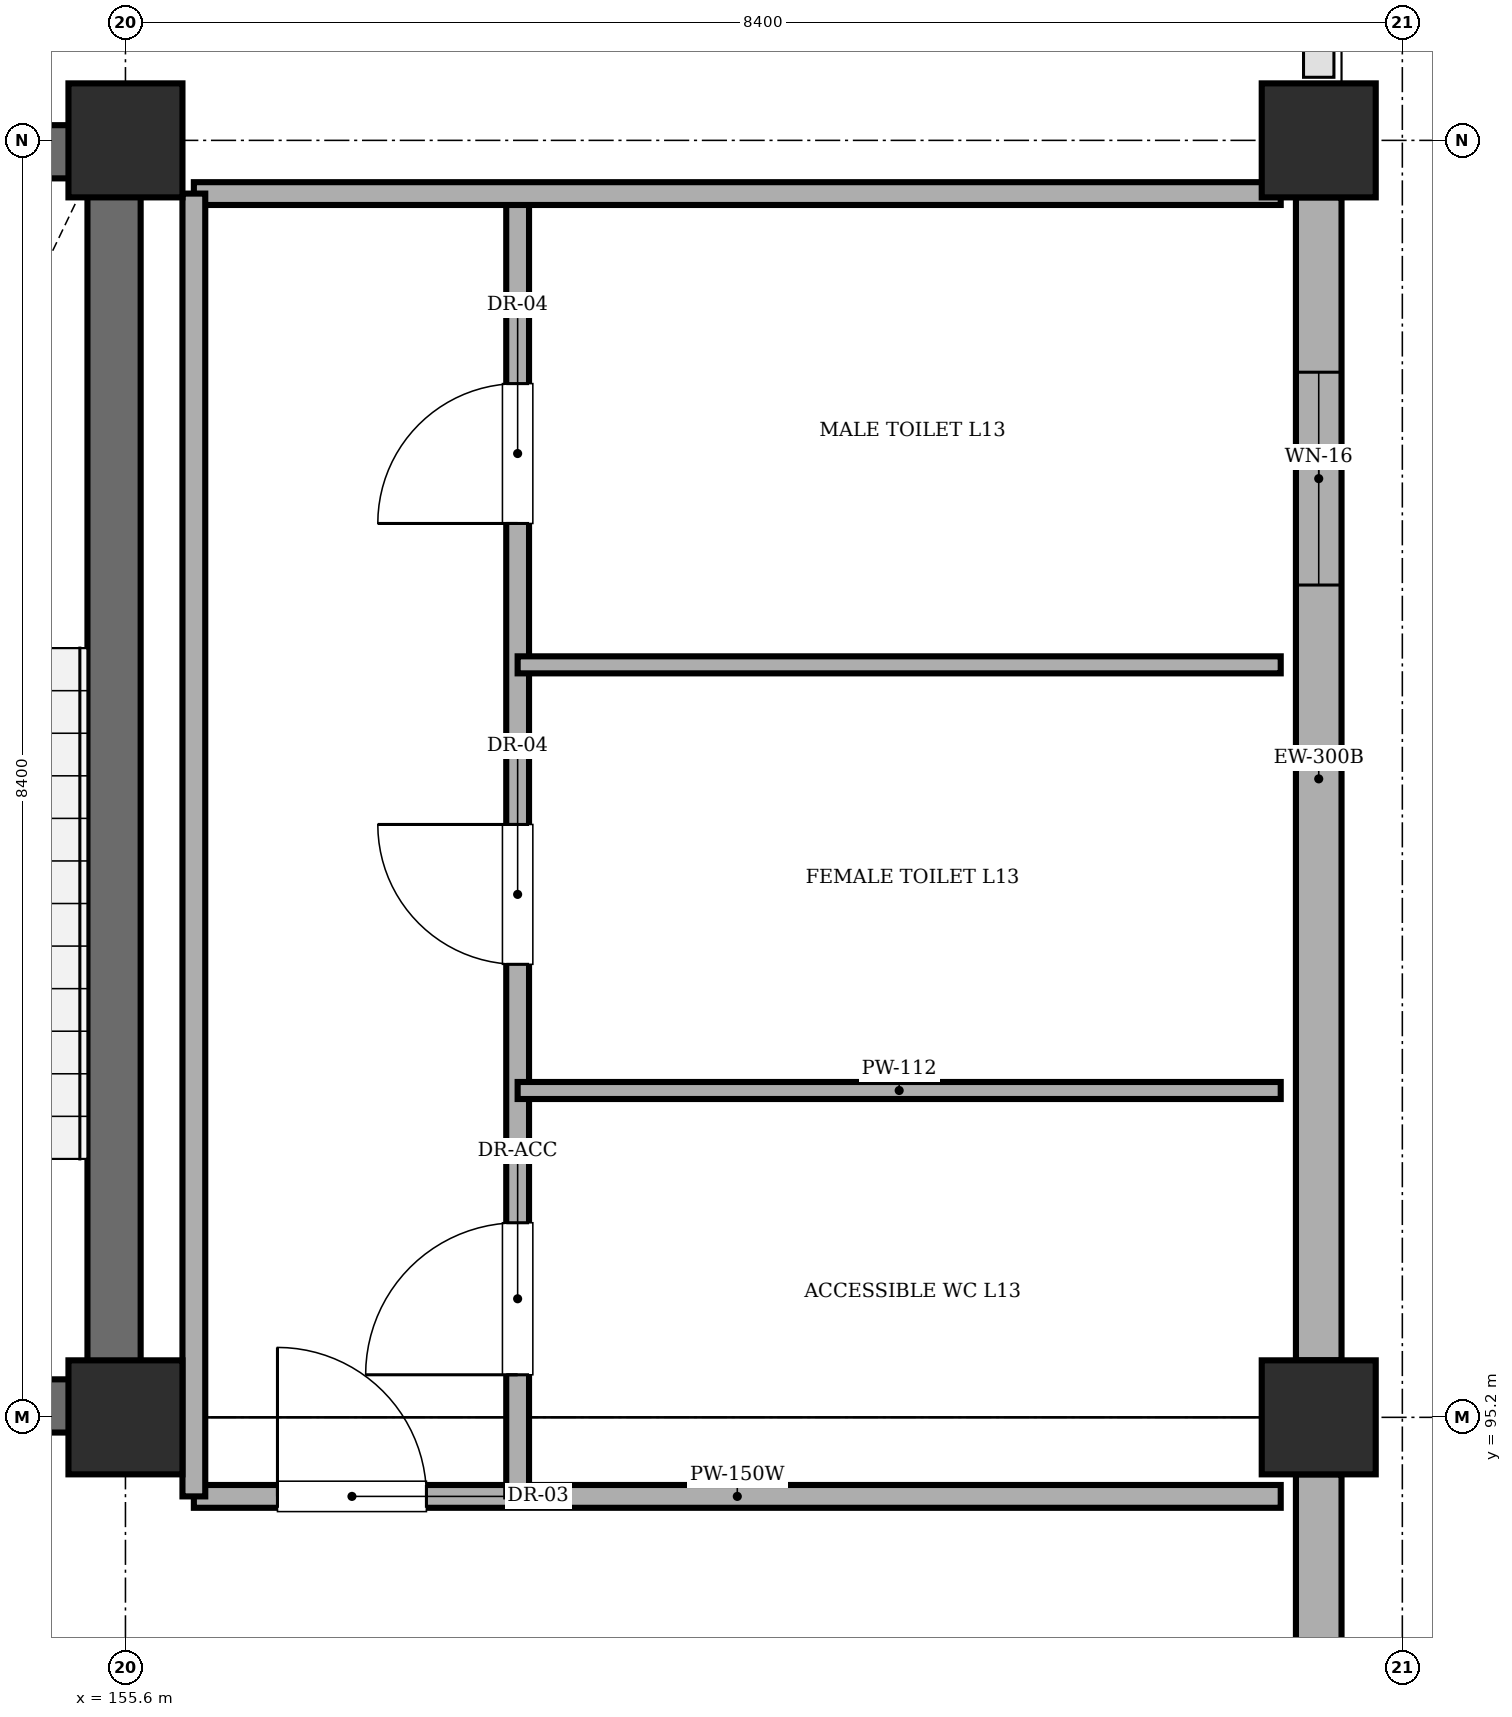
"""IFC4 building model, lengths in metres.
Left out: names, types, materials, properties, quantities, classifications, styles, units other than length and angle.
Written with IfcOpenShell. Run it as: python <this file> out.ifc"""

import sys

from ifc_helpers import new_model, si_unit, direction, frame, frame_2d, origin, origin_2d, place, context, subcontext, project, spatial, rectangle, extrude, element, fill, save


model = new_model("IFC4")
c1 = context("Model", 3, precision=1e-05, world=origin(), true_north=direction((0.0, 1.0)))
c2 = subcontext(c1, "Body", "Model", "MODEL_VIEW")
j1 = project(units=[si_unit("LENGTHUNIT", "METRE"), si_unit("PLANEANGLEUNIT", "RADIAN")], contexts=[c1])
p1 = place(None, origin())
s1 = spatial("IfcSite", under=j1, at=p1, CompositionType="ELEMENT")
p2 = place(p1, origin())
s2 = spatial("IfcBuilding", under=s1, at=p2, CompositionType="ELEMENT")
p3 = place(p2, frame((0.0, 0.0, 52.8)))
s3 = spatial("IfcBuildingStorey", under=s2, at=p3, CompositionType="ELEMENT", Elevation=52.8)
for number, where, z_axis, x_axis in (
    (1, (155.6, 95.2, 0.0), (0.0, 0.0, 1.0), (1.0, 0.0, 0.0)),
    (2, (155.6, 103.6, 0.0), (0.0, 0.0, 1.0), (1.0, 0.0, 0.0)),
    (3, (163.45, 95.2, 0.0), (0.0, 0.0, 1.0), (1.0, 0.0, 0.0)),
    (4, (163.45, 103.6, 0.0), (0.0, 0.0, 1.0), (1.0, 0.0, 0.0)),
):
    element("IfcColumn", number, at=place(p3, frame(where, z_axis=z_axis, x_axis=x_axis)), inside=s3, PredefinedType="COLUMN", context=c2, shape_type="SweptSolid", body=[
        extrude(rectangle(XDim=0.75, YDim=0.75, at=origin_2d()), origin(), (0.0, 0.0, 1.0), 4.03),
    ])
for number, where, z_axis, x_axis in (
    (5, (151.9, 95.275, 0.0), (0.0, 0.0, 1.0), (1.0, 0.0, 0.0)),
    (6, (151.9, 103.525, 0.0), (0.0, 0.0, 1.0), (1.0, 0.0, 0.0)),
):
    element("IfcWall", number, at=place(p3, frame(where, z_axis=z_axis, x_axis=x_axis)), inside=s3, PredefinedType="SHEAR", context=c2, shape_type="SweptSolid", body=[
        extrude(rectangle(XDim=3.8, YDim=0.35, at=frame_2d((1.9, 0.0))), origin(), (0.0, 0.0, 1.0), 4.03),
    ])
p4 = place(p3, frame((155.525, 95.45, 0.0), z_axis=(0.0, 0.0, 1.0), x_axis=(0.0, 1.0, 0.0)))
e7 = element("IfcWall", 7, at=p4, inside=s3, PredefinedType="SHEAR", context=c2, shape_type="SweptSolid", body=[
    extrude(rectangle(XDim=7.9, YDim=0.35, at=frame_2d((3.95, 0.0))), origin(), (0.0, 0.0, 1.0), 4.03),
])
p5 = place(p3, frame((163.45, 94.825, 0.0), z_axis=(0.0, 0.0, 1.0), x_axis=(0.0, -1.0, 0.0)))
e8 = element("IfcWall", 8, at=p5, inside=s3, PredefinedType="STANDARD", context=c2, shape_type="SweptSolid", body=[
    extrude(rectangle(XDim=7.65, YDim=0.3, at=frame_2d((3.825, 0.0))), origin(), (0.0, 0.0, 1.0), 3.33),
])
p6 = place(p5, frame((4.2, 0.0, 1.1)))
e9 = element("IfcOpeningElement", 9, at=p6, cuts=e8, PredefinedType="OPENING", context=c2, shape_type="SweptSolid", body=[
    extrude(rectangle(XDim=1.8, YDim=1.8, at=frame_2d((0.9, 0.9))), frame((0.0, 0.16, 0.0), z_axis=(0.0, -1.0, 0.0), x_axis=(1.0, 0.0, 0.0)), (0.0, 0.0, 1.0), 0.32),
])
p7 = place(p3, frame((163.45, 103.225, 0.0), z_axis=(0.0, 0.0, 1.0), x_axis=(0.0, -1.0, 0.0)))
e10 = element("IfcWall", 10, at=p7, inside=s3, PredefinedType="STANDARD", context=c2, shape_type="SweptSolid", body=[
    extrude(rectangle(XDim=7.65, YDim=0.3, at=frame_2d((3.825, 0.0))), origin(), (0.0, 0.0, 1.0), 3.33),
])
p8 = place(p7, frame((1.15, 0.0, 1.1)))
e11 = element("IfcOpeningElement", 11, at=p8, cuts=e10, PredefinedType="OPENING", context=c2, shape_type="SweptSolid", body=[
    extrude(rectangle(XDim=1.4, YDim=1.4, at=frame_2d((0.7, 0.7))), frame((0.0, 0.16, 0.0), z_axis=(0.0, -1.0, 0.0), x_axis=(1.0, 0.0, 0.0)), (0.0, 0.0, 1.0), 0.32),
])
p9 = place(p3, frame((156.05, 94.68, 0.0), z_axis=(0.0, 0.0, 1.0), x_axis=(1.0, 0.0, 0.0)))
e12 = element("IfcWall", 12, at=p9, inside=s3, PredefinedType="PARTITIONING", context=c2, shape_type="SweptSolid", body=[
    extrude(rectangle(XDim=7.15, YDim=0.15, at=frame_2d((3.575, 0.0))), origin(), (0.0, 0.0, 1.0), 4.03),
])
p10 = place(p9, frame((0.55, 0.0, 0.0)))
e13 = element("IfcOpeningElement", 13, at=p10, cuts=e12, PredefinedType="OPENING", context=c2, shape_type="SweptSolid", body=[
    extrude(rectangle(XDim=0.98, YDim=2.12, at=frame_2d((0.49, 1.06))), frame((0.0, 0.085, 0.0), z_axis=(0.0, -1.0, 0.0), x_axis=(1.0, 0.0, 0.0)), (0.0, 0.0, 1.0), 0.17),
])
p11 = place(p3, frame((158.18, 94.68, 0.0), z_axis=(0.0, 0.0, 1.0), x_axis=(0.0, 1.0, 0.0)))
e14 = element("IfcWall", 14, at=p11, inside=s3, PredefinedType="PARTITIONING", context=c2, shape_type="SweptSolid", body=[
    extrude(rectangle(XDim=8.57, YDim=0.15, at=frame_2d((4.285, 0.0))), origin(), (0.0, 0.0, 1.0), 4.03),
])
p12 = place(p11, frame((0.8, 0.0, 0.0)))
e15 = element("IfcOpeningElement", 15, at=p12, cuts=e14, PredefinedType="OPENING", context=c2, shape_type="SweptSolid", body=[
    extrude(rectangle(XDim=1.0, YDim=2.12, at=frame_2d((0.5, 1.06))), frame((0.0, 0.085, 0.0), z_axis=(0.0, -1.0, 0.0), x_axis=(1.0, 0.0, 0.0)), (0.0, 0.0, 1.0), 0.17),
])
p13 = place(p11, frame((3.5, 0.0, 0.0)))
e16 = element("IfcOpeningElement", 16, at=p13, cuts=e14, PredefinedType="OPENING", context=c2, shape_type="SweptSolid", body=[
    extrude(rectangle(XDim=0.92, YDim=2.1, at=frame_2d((0.46, 1.05))), frame((0.0, 0.085, 0.0), z_axis=(0.0, -1.0, 0.0), x_axis=(1.0, 0.0, 0.0)), (0.0, 0.0, 1.0), 0.17),
])
p14 = place(p11, frame((6.4, 0.0, 0.0)))
e17 = element("IfcOpeningElement", 17, at=p14, cuts=e14, PredefinedType="OPENING", context=c2, shape_type="SweptSolid", body=[
    extrude(rectangle(XDim=0.92, YDim=2.1, at=frame_2d((0.46, 1.05))), frame((0.0, 0.085, 0.0), z_axis=(0.0, -1.0, 0.0), x_axis=(1.0, 0.0, 0.0)), (0.0, 0.0, 1.0), 0.17),
])
for number, where, z_axis, x_axis in (
    (18, (158.18, 97.35, 0.0), (0.0, 0.0, 1.0), (1.0, 0.0, 0.0)),
    (19, (158.18, 100.15, 0.0), (0.0, 0.0, 1.0), (1.0, 0.0, 0.0)),
):
    element("IfcWall", number, at=place(p3, frame(where, z_axis=z_axis, x_axis=x_axis)), inside=s3, PredefinedType="PARTITIONING", context=c2, shape_type="SweptSolid", body=[
        extrude(rectangle(XDim=5.02, YDim=0.112, at=frame_2d((2.51, 0.0))), origin(), (0.0, 0.0, 1.0), 4.03),
    ])
p15 = place(p3, frame((156.05, 103.25, 0.0), z_axis=(0.0, 0.0, 1.0), x_axis=(1.0, 0.0, 0.0)))
e20 = element("IfcWall", 20, at=p15, inside=s3, PredefinedType="PARTITIONING", context=c2, shape_type="SweptSolid", body=[
    extrude(rectangle(XDim=7.15, YDim=0.15, at=frame_2d((3.575, 0.0))), origin(), (0.0, 0.0, 1.0), 4.03),
])
p16 = place(p3, frame((156.05, 94.68, 0.0), z_axis=(0.0, 0.0, 1.0), x_axis=(0.0, 1.0, 0.0)))
e21 = element("IfcWall", 21, at=p16, inside=s3, PredefinedType="PARTITIONING", context=c2, shape_type="SweptSolid", body=[
    extrude(rectangle(XDim=8.57, YDim=0.15, at=frame_2d((4.285, 0.0))), origin(), (0.0, 0.0, 1.0), 4.03),
])
p17 = place(p8, origin())
e22 = element("IfcWindow", 22, at=p17, inside=s3, PartitioningType="SINGLE_PANEL", PredefinedType="WINDOW", context=c2, shape_type="SweptSolid", body=[
    extrude(rectangle(XDim=1.4, YDim=1.4, at=frame_2d((0.7, 0.7))), frame((0.0, 0.03, 0.0), z_axis=(0.0, -1.0, 0.0), x_axis=(1.0, 0.0, 0.0)), (0.0, 0.0, 1.0), 0.06),
])
fill(e11, e22)
p18 = place(p10, origin())
e23 = element("IfcDoor", 23, at=p18, inside=s3, OperationType="SINGLE_SWING_LEFT", PredefinedType="DOOR", context=c2, shape_type="SweptSolid", body=[
    extrude(rectangle(XDim=0.98, YDim=2.12, at=frame_2d((0.49, 1.06))), frame((0.0, 0.025, 0.0), z_axis=(0.0, -1.0, 0.0), x_axis=(1.0, 0.0, 0.0)), (0.0, 0.0, 1.0), 0.05),
])
fill(e13, e23)
p19 = place(p12, origin())
e24 = element("IfcDoor", 24, at=p19, inside=s3, OperationType="SINGLE_SWING_LEFT", PredefinedType="DOOR", context=c2, shape_type="SweptSolid", body=[
    extrude(rectangle(XDim=1.0, YDim=2.12, at=frame_2d((0.5, 1.06))), frame((0.0, 0.025, 0.0), z_axis=(0.0, -1.0, 0.0), x_axis=(1.0, 0.0, 0.0)), (0.0, 0.0, 1.0), 0.05),
])
fill(e15, e24)
p20 = place(p13, origin())
e25 = element("IfcDoor", 25, at=p20, inside=s3, OperationType="SINGLE_SWING_RIGHT", PredefinedType="DOOR", context=c2, shape_type="SweptSolid", body=[
    extrude(rectangle(XDim=0.92, YDim=2.1, at=frame_2d((0.46, 1.05))), frame((0.0, 0.025, 0.0), z_axis=(0.0, -1.0, 0.0), x_axis=(1.0, 0.0, 0.0)), (0.0, 0.0, 1.0), 0.05),
])
fill(e16, e25)
p21 = place(p14, origin())
e26 = element("IfcDoor", 26, at=p21, inside=s3, OperationType="SINGLE_SWING_LEFT", PredefinedType="DOOR", context=c2, shape_type="SweptSolid", body=[
    extrude(rectangle(XDim=0.92, YDim=2.1, at=frame_2d((0.46, 1.05))), frame((0.0, 0.025, 0.0), z_axis=(0.0, -1.0, 0.0), x_axis=(1.0, 0.0, 0.0)), (0.0, 0.0, 1.0), 0.05),
])
fill(e17, e26)
save(model, sys.argv[1])
